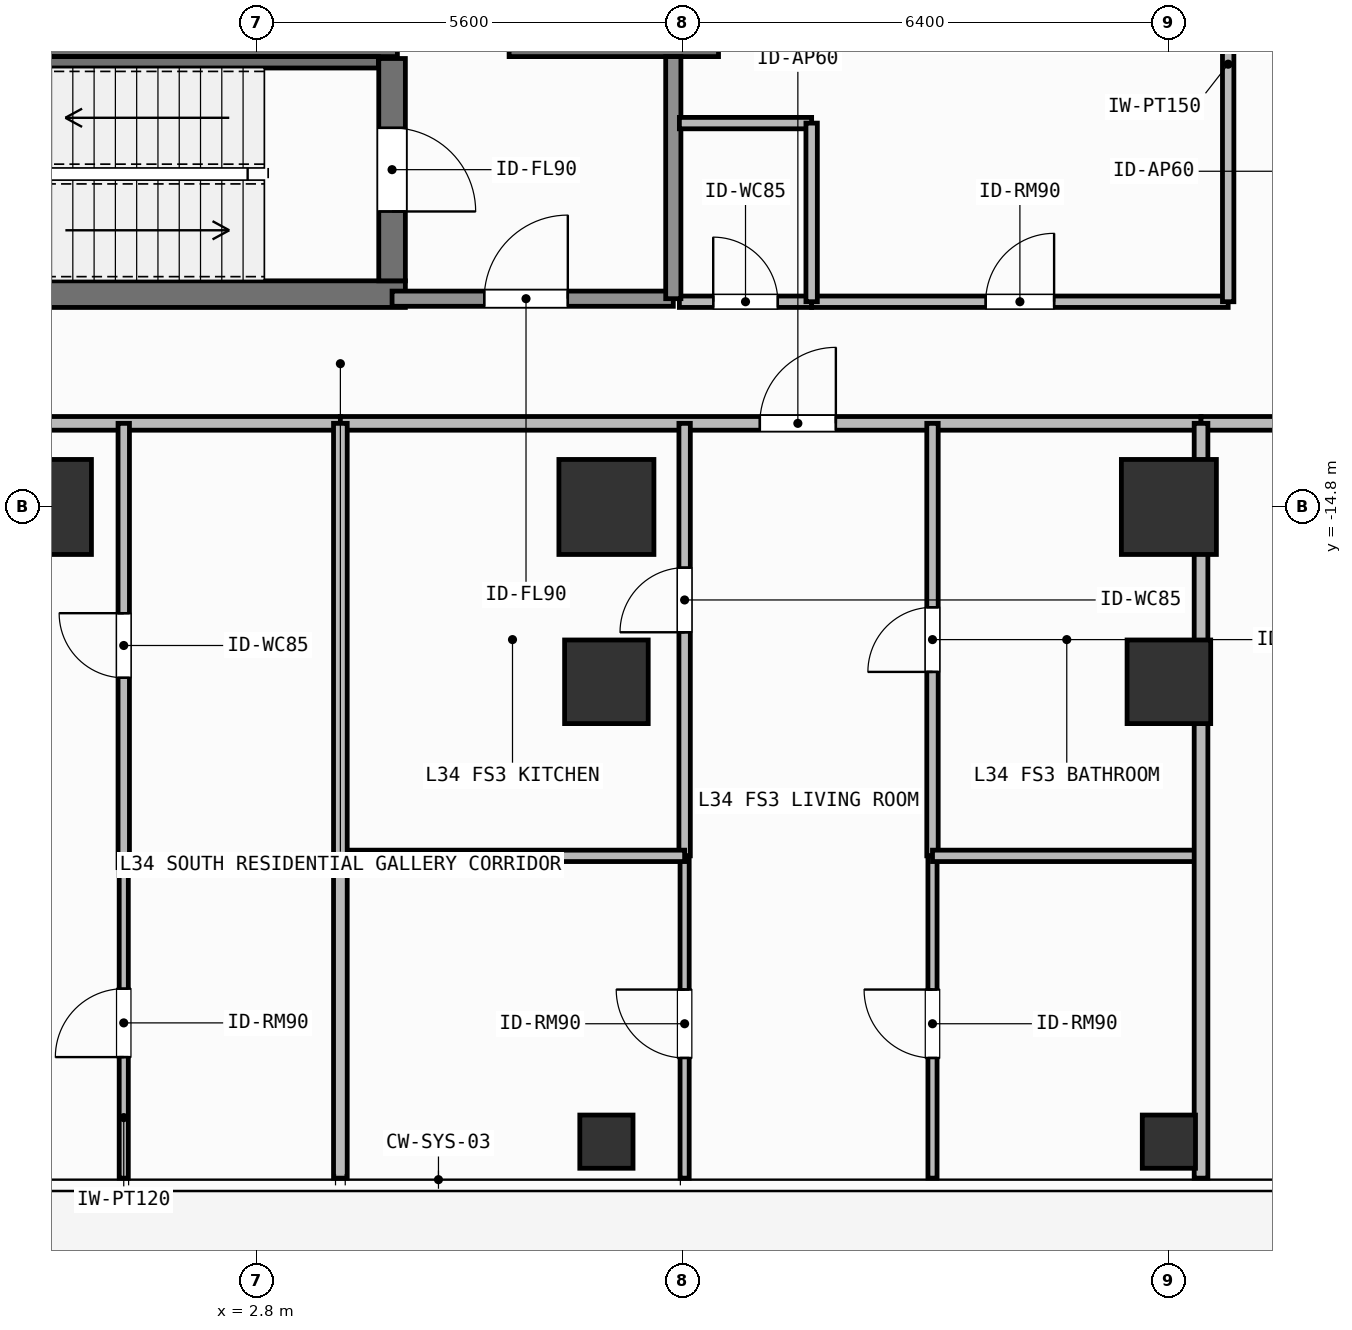
"""IFC4 building model, lengths in metres.
Left out: names, types, materials, properties, quantities, classifications, styles, units other than length and angle.
Written with IfcOpenShell. Run it as: python <this file> out.ifc"""

import sys

from ifc_helpers import new_model, si_unit, direction, frame, frame_2d, origin, origin_2d, place, context, subcontext, project, spatial, rectangle, hollow_rectangle, extrude, element, fill, save


model = new_model("IFC4")
c1 = context("Model", 3, precision=1e-05, world=origin(), true_north=direction((0.0, 1.0)))
c2 = subcontext(c1, "Body", "Model", "MODEL_VIEW")
j1 = project(units=[si_unit("LENGTHUNIT", "METRE"), si_unit("PLANEANGLEUNIT", "RADIAN")], contexts=[c1])
p1 = place(None, origin())
s1 = spatial("IfcSite", under=j1, at=p1, CompositionType="ELEMENT")
p2 = place(p1, origin())
s2 = spatial("IfcBuilding", under=s1, at=p2, CompositionType="ELEMENT")
p3 = place(p2, frame((0.0, 0.0, 136.8)))
s3 = spatial("IfcBuildingStorey", under=s2, at=p3, CompositionType="ELEMENT", Elevation=136.8)
p4 = place(p3, frame((-2.62, -8.4, 0.0), z_axis=(0.0, 0.0, 1.0), x_axis=(1.0, 0.0, 0.0)))
e1 = element("IfcWall", 1, at=p4, inside=s3, PredefinedType="SHEAR", context=c2, shape_type="SweptSolid", body=[
    extrude(rectangle(XDim=7.27, YDim=0.95, at=frame_2d((3.635, 0.0))), origin(), (0.0, 0.0, 1.0), 3.9),
])
p5 = place(p3, frame((6.12, -8.4, 0.0), z_axis=(0.0, 0.0, 1.0), x_axis=(1.0, 0.0, 0.0)))
e2 = element("IfcWall", 2, at=p5, inside=s3, PredefinedType="SHEAR", context=c2, shape_type="SweptSolid", body=[
    extrude(rectangle(XDim=2.755, YDim=0.95, at=frame_2d((1.377, 0.0))), origin(), (0.0, 0.0, 1.0), 3.9),
])
p6 = place(p3, frame((-2.555, -12.0, 0.0), z_axis=(0.0, 0.0, 1.0), x_axis=(1.0, 0.0, 0.0)))
e3 = element("IfcWall", 3, at=p6, inside=s3, PredefinedType="SHEAR", context=c2, shape_type="SweptSolid", body=[
    extrude(rectangle(XDim=7.31, YDim=0.35, at=frame_2d((3.655, 0.0))), origin(), (0.0, 0.0, 1.0), 3.9),
])
p7 = place(p3, frame((-2.2, -8.95, 0.0), z_axis=(0.0, 0.0, 1.0), x_axis=(1.0, 0.0, 0.0)))
e4 = element("IfcWall", 4, at=p7, inside=s3, PredefinedType="SHEAR", context=c2, shape_type="SweptSolid", body=[
    extrude(rectangle(XDim=6.6, YDim=0.15, at=frame_2d((3.3, 0.0))), origin(), (0.0, 0.0, 1.0), 3.9),
])
p8 = place(p3, frame((4.58, -8.9, 0.0), z_axis=(0.0, 0.0, 1.0), x_axis=(0.0, -1.0, 0.0)))
e5 = element("IfcWall", 5, at=p8, inside=s3, PredefinedType="SHEAR", context=c2, shape_type="SweptSolid", body=[
    extrude(rectangle(XDim=2.925, YDim=0.35, at=frame_2d((1.462, 0.0))), origin(), (0.0, 0.0, 1.0), 3.9),
])
p9 = place(p8, frame((0.913, 0.0, 0.0)))
e6 = element("IfcOpeningElement", 6, at=p9, cuts=e5, PredefinedType="OPENING", context=c2, shape_type="SweptSolid", body=[
    extrude(rectangle(XDim=1.1, YDim=2.15, at=frame_2d((0.55, 1.075))), frame((0.0, 0.185, 0.0), z_axis=(0.0, -1.0, 0.0), x_axis=(1.0, 0.0, 0.0)), (0.0, 0.0, 1.0), 0.37),
])
for number, where, z_axis, x_axis in (
    (7, (0.0, -14.8, 0.0), (0.0, 0.0, 1.0), (1.0, 0.0, 0.0)),
    (8, (7.4, -14.8, 0.0), (0.0, 0.0, 1.0), (1.0, 0.0, 0.0)),
    (9, (14.8, -14.8, 0.0), (0.0, 0.0, 1.0), (1.0, 0.0, 0.0)),
):
    element("IfcColumn", number, at=place(p3, frame(where, z_axis=z_axis, x_axis=x_axis)), inside=s3, PredefinedType="COLUMN", context=c2, shape_type="SweptSolid", body=[
        extrude(rectangle(XDim=1.25, YDim=1.25, at=origin_2d()), origin(), (0.0, 0.0, 1.0), 3.9),
    ])
for number, where, z_axis, x_axis in (
    (10, (7.4, -17.1, 0.0), (0.0, 0.0, 1.0), (1.0, 0.0, 0.0)),
    (11, (14.8, -17.1, 0.0), (0.0, 0.0, 1.0), (1.0, 0.0, 0.0)),
):
    element("IfcColumn", number, at=place(p3, frame(where, z_axis=z_axis, x_axis=x_axis)), inside=s3, PredefinedType="COLUMN", context=c2, shape_type="SweptSolid", body=[
        extrude(rectangle(XDim=1.1, YDim=1.1, at=origin_2d()), origin(), (0.0, 0.0, 1.0), 3.9),
    ])
for number, where, z_axis, x_axis in (
    (12, (7.4, -23.15, 0.0), (0.0, 0.0, 1.0), (1.0, 0.0, 0.0)),
    (13, (14.8, -23.15, 0.0), (0.0, 0.0, 1.0), (1.0, 0.0, 0.0)),
):
    element("IfcColumn", number, at=place(p3, frame(where, z_axis=z_axis, x_axis=x_axis)), inside=s3, PredefinedType="COLUMN", context=c2, shape_type="SweptSolid", body=[
        extrude(hollow_rectangle(XDim=0.7, YDim=0.7, WallThickness=0.032, at=origin_2d()), origin(), (0.0, 0.0, 1.0), 3.9),
    ])
p10 = place(p3, frame((4.58, -12.06, 0.0), z_axis=(0.0, 0.0, 1.0), x_axis=(1.0, 0.0, 0.0)))
e14 = element("IfcWall", 14, at=p10, inside=s3, PredefinedType="SOLIDWALL", context=c2, shape_type="SweptSolid", body=[
    extrude(rectangle(XDim=3.7, YDim=0.2, at=frame_2d((1.85, 0.0))), origin(), (0.0, 0.0, 1.0), 3.68),
])
p11 = place(p10, frame((1.212, 0.0, 0.0)))
e15 = element("IfcOpeningElement", 15, at=p11, cuts=e14, PredefinedType="OPENING", context=c2, shape_type="SweptSolid", body=[
    extrude(rectangle(XDim=1.1, YDim=2.15, at=frame_2d((0.55, 1.075))), frame((0.0, 0.11, 0.0), z_axis=(0.0, -1.0, 0.0), x_axis=(1.0, 0.0, 0.0)), (0.0, 0.0, 1.0), 0.22),
])
p12 = place(p3, frame((8.36, -12.1, 0.0), z_axis=(0.0, 0.0, 1.0), x_axis=(1.0, 0.0, 0.0)))
e16 = element("IfcWall", 16, at=p12, inside=s3, PredefinedType="PARTITIONING", context=c2, shape_type="SweptSolid", body=[
    extrude(rectangle(XDim=1.74, YDim=0.15, at=frame_2d((0.87, 0.0))), origin(), (0.0, 0.0, 1.0), 3.68),
])
p13 = place(p12, frame((0.445, 0.0, 0.0)))
e17 = element("IfcOpeningElement", 17, at=p13, cuts=e16, PredefinedType="OPENING", context=c2, shape_type="SweptSolid", body=[
    extrude(rectangle(XDim=0.85, YDim=2.1, at=frame_2d((0.425, 1.05))), frame((0.0, 0.085, 0.0), z_axis=(0.0, -1.0, 0.0), x_axis=(1.0, 0.0, 0.0)), (0.0, 0.0, 1.0), 0.17),
])
p14 = place(p3, frame((10.1, -12.1, 0.0), z_axis=(0.0, 0.0, 1.0), x_axis=(1.0, 0.0, 0.0)))
e18 = element("IfcWall", 18, at=p14, inside=s3, PredefinedType="PARTITIONING", context=c2, shape_type="SweptSolid", body=[
    extrude(rectangle(XDim=5.48, YDim=0.15, at=frame_2d((2.74, 0.0))), origin(), (0.0, 0.0, 1.0), 3.68),
])
p15 = place(p14, frame((2.29, 0.0, 0.0)))
e19 = element("IfcOpeningElement", 19, at=p15, cuts=e18, PredefinedType="OPENING", context=c2, shape_type="SweptSolid", body=[
    extrude(rectangle(XDim=0.9, YDim=2.1, at=frame_2d((0.45, 1.05))), frame((0.0, 0.085, 0.0), z_axis=(0.0, -1.0, 0.0), x_axis=(1.0, 0.0, 0.0)), (0.0, 0.0, 1.0), 0.17),
])
p16 = place(p3, frame((-7.423, -13.7, 0.0), z_axis=(0.0, 0.0, 1.0), x_axis=(1.0, 0.0, 0.0)))
e20 = element("IfcWall", 20, at=p16, inside=s3, PredefinedType="PARTITIONING", context=c2, shape_type="SweptSolid", body=[
    extrude(rectangle(XDim=11.323, YDim=0.18, at=frame_2d((5.662, 0.0))), origin(), (0.0, 0.0, 1.0), 3.68),
])
p17 = place(p16, frame((5.34, 0.0, 0.0)))
e21 = element("IfcOpeningElement", 21, at=p17, cuts=e20, PredefinedType="OPENING", context=c2, shape_type="SweptSolid", body=[
    extrude(rectangle(XDim=1.0, YDim=2.2, at=frame_2d((0.5, 1.1))), frame((0.0, 0.1, 0.0), z_axis=(0.0, -1.0, 0.0), x_axis=(1.0, 0.0, 0.0)), (0.0, 0.0, 1.0), 0.2),
])
p18 = place(p3, frame((1.05, -19.545, 0.0), z_axis=(0.0, 0.0, 1.0), x_axis=(0.0, 1.0, 0.0)))
e22 = element("IfcWall", 22, at=p18, inside=s3, PredefinedType="PARTITIONING", context=c2, shape_type="SweptSolid", body=[
    extrude(rectangle(XDim=5.845, YDim=0.15, at=frame_2d((2.922, 0.0))), origin(), (0.0, 0.0, 1.0), 3.68),
])
p19 = place(p18, frame((2.498, 0.0, 0.0)))
e23 = element("IfcOpeningElement", 23, at=p19, cuts=e22, PredefinedType="OPENING", context=c2, shape_type="SweptSolid", body=[
    extrude(rectangle(XDim=0.85, YDim=2.1, at=frame_2d((0.425, 1.05))), frame((0.0, 0.085, 0.0), z_axis=(0.0, -1.0, 0.0), x_axis=(1.0, 0.0, 0.0)), (0.0, 0.0, 1.0), 0.17),
])
p20 = place(p3, frame((1.05, -23.63, 0.0), z_axis=(0.0, 0.0, 1.0), x_axis=(0.0, 1.0, 0.0)))
e24 = element("IfcWall", 24, at=p20, inside=s3, PredefinedType="PARTITIONING", context=c2, shape_type="SweptSolid", body=[
    extrude(rectangle(XDim=4.085, YDim=0.12, at=frame_2d((2.042, 0.0))), origin(), (0.0, 0.0, 1.0), 3.68),
])
p21 = place(p20, frame((1.593, 0.0, 0.0)))
e25 = element("IfcOpeningElement", 25, at=p21, cuts=e24, PredefinedType="OPENING", context=c2, shape_type="SweptSolid", body=[
    extrude(rectangle(XDim=0.9, YDim=2.1, at=frame_2d((0.45, 1.05))), frame((0.0, 0.07, 0.0), z_axis=(0.0, -1.0, 0.0), x_axis=(1.0, 0.0, 0.0)), (0.0, 0.0, 1.0), 0.14),
])
p22 = place(p3, frame((3.9, -13.7, 0.0), z_axis=(0.0, 0.0, 1.0), x_axis=(1.0, 0.0, 0.0)))
e26 = element("IfcWall", 26, at=p22, inside=s3, PredefinedType="PARTITIONING", context=c2, shape_type="SweptSolid", body=[
    extrude(rectangle(XDim=11.323, YDim=0.18, at=frame_2d((5.662, 0.0))), origin(), (0.0, 0.0, 1.0), 3.68),
])
p23 = place(p22, frame((5.519, 0.0, 0.0)))
e27 = element("IfcOpeningElement", 27, at=p23, cuts=e26, PredefinedType="OPENING", context=c2, shape_type="SweptSolid", body=[
    extrude(rectangle(XDim=1.0, YDim=2.2, at=frame_2d((0.5, 1.1))), frame((0.0, 0.1, 0.0), z_axis=(0.0, -1.0, 0.0), x_axis=(1.0, 0.0, 0.0)), (0.0, 0.0, 1.0), 0.2),
])
p24 = place(p3, frame((8.429, -19.39, 0.0), z_axis=(0.0, 0.0, 1.0), x_axis=(0.0, 1.0, 0.0)))
e28 = element("IfcWall", 28, at=p24, inside=s3, PredefinedType="PARTITIONING", context=c2, shape_type="SweptSolid", body=[
    extrude(rectangle(XDim=5.69, YDim=0.15, at=frame_2d((2.845, 0.0))), origin(), (0.0, 0.0, 1.0), 3.68),
])
p25 = place(p24, frame((2.941, 0.0, 0.0)))
e29 = element("IfcOpeningElement", 29, at=p25, cuts=e28, PredefinedType="OPENING", context=c2, shape_type="SweptSolid", body=[
    extrude(rectangle(XDim=0.85, YDim=2.1, at=frame_2d((0.425, 1.05))), frame((0.0, 0.085, 0.0), z_axis=(0.0, -1.0, 0.0), x_axis=(1.0, 0.0, 0.0)), (0.0, 0.0, 1.0), 0.17),
])
p26 = place(p3, frame((8.429, -23.63, 0.0), z_axis=(0.0, 0.0, 1.0), x_axis=(0.0, 1.0, 0.0)))
e30 = element("IfcWall", 30, at=p26, inside=s3, PredefinedType="PARTITIONING", context=c2, shape_type="SweptSolid", body=[
    extrude(rectangle(XDim=4.24, YDim=0.12, at=frame_2d((2.12, 0.0))), origin(), (0.0, 0.0, 1.0), 3.68),
])
p27 = place(p26, frame((1.581, 0.0, 0.0)))
e31 = element("IfcOpeningElement", 31, at=p27, cuts=e30, PredefinedType="OPENING", context=c2, shape_type="SweptSolid", body=[
    extrude(rectangle(XDim=0.9, YDim=2.1, at=frame_2d((0.45, 1.05))), frame((0.0, 0.07, 0.0), z_axis=(0.0, -1.0, 0.0), x_axis=(1.0, 0.0, 0.0)), (0.0, 0.0, 1.0), 0.14),
])
p28 = place(p3, frame((11.69, -19.39, 0.0), z_axis=(0.0, 0.0, 1.0), x_axis=(0.0, 1.0, 0.0)))
e32 = element("IfcWall", 32, at=p28, inside=s3, PredefinedType="PARTITIONING", context=c2, shape_type="SweptSolid", body=[
    extrude(rectangle(XDim=5.69, YDim=0.15, at=frame_2d((2.845, 0.0))), origin(), (0.0, 0.0, 1.0), 3.68),
])
p29 = place(p28, frame((2.42, 0.0, 0.0)))
e33 = element("IfcOpeningElement", 33, at=p29, cuts=e32, PredefinedType="OPENING", context=c2, shape_type="SweptSolid", body=[
    extrude(rectangle(XDim=0.85, YDim=2.1, at=frame_2d((0.425, 1.05))), frame((0.0, 0.085, 0.0), z_axis=(0.0, -1.0, 0.0), x_axis=(1.0, 0.0, 0.0)), (0.0, 0.0, 1.0), 0.17),
])
p30 = place(p3, frame((11.69, -23.63, 0.0), z_axis=(0.0, 0.0, 1.0), x_axis=(0.0, 1.0, 0.0)))
e34 = element("IfcWall", 34, at=p30, inside=s3, PredefinedType="PARTITIONING", context=c2, shape_type="SweptSolid", body=[
    extrude(rectangle(XDim=4.24, YDim=0.12, at=frame_2d((2.12, 0.0))), origin(), (0.0, 0.0, 1.0), 3.68),
])
p31 = place(p30, frame((1.581, 0.0, 0.0)))
e35 = element("IfcOpeningElement", 35, at=p31, cuts=e34, PredefinedType="OPENING", context=c2, shape_type="SweptSolid", body=[
    extrude(rectangle(XDim=0.9, YDim=2.1, at=frame_2d((0.45, 1.05))), frame((0.0, 0.07, 0.0), z_axis=(0.0, -1.0, 0.0), x_axis=(1.0, 0.0, 0.0)), (0.0, 0.0, 1.0), 0.14),
])
p32 = place(p3, frame((15.223, -13.7, 0.0), z_axis=(0.0, 0.0, 1.0), x_axis=(1.0, 0.0, 0.0)))
e36 = element("IfcWall", 36, at=p32, inside=s3, PredefinedType="PARTITIONING", context=c2, shape_type="SweptSolid", body=[
    extrude(rectangle(XDim=8.897, YDim=0.18, at=frame_2d((4.449, 0.0))), origin(), (0.0, 0.0, 1.0), 3.68),
])
p33 = place(p32, frame((2.451, 0.0, 0.0)))
e37 = element("IfcOpeningElement", 37, at=p33, cuts=e36, PredefinedType="OPENING", context=c2, shape_type="SweptSolid", body=[
    extrude(rectangle(XDim=1.0, YDim=2.2, at=frame_2d((0.5, 1.1))), frame((0.0, 0.1, 0.0), z_axis=(0.0, -1.0, 0.0), x_axis=(1.0, 0.0, 0.0)), (0.0, 0.0, 1.0), 0.2),
])
p34 = place(p3, frame((8.28, -12.06, 0.0), z_axis=(0.0, 0.0, 1.0), x_axis=(0.0, 1.0, 0.0)))
e38 = element("IfcWall", 38, at=p34, inside=s3, PredefinedType="SOLIDWALL", context=c2, shape_type="SweptSolid", body=[
    extrude(rectangle(XDim=3.185, YDim=0.2, at=frame_2d((1.593, 0.0))), origin(), (0.0, 0.0, 1.0), 3.68),
])
p35 = place(p3, frame((8.36, -9.75, 0.0), z_axis=(0.0, 0.0, 1.0), x_axis=(1.0, 0.0, 0.0)))
e39 = element("IfcWall", 39, at=p35, inside=s3, PredefinedType="PARTITIONING", context=c2, shape_type="SweptSolid", body=[
    extrude(rectangle(XDim=1.74, YDim=0.15, at=frame_2d((0.87, 0.0))), origin(), (0.0, 0.0, 1.0), 3.68),
])
p36 = place(p3, frame((10.1, -12.1, 0.0), z_axis=(0.0, 0.0, 1.0), x_axis=(0.0, 1.0, 0.0)))
e40 = element("IfcWall", 40, at=p36, inside=s3, PredefinedType="PARTITIONING", context=c2, shape_type="SweptSolid", body=[
    extrude(rectangle(XDim=2.35, YDim=0.15, at=frame_2d((1.175, 0.0))), origin(), (0.0, 0.0, 1.0), 3.68),
])
p37 = place(p3, frame((15.58, -12.1, 0.0), z_axis=(0.0, 0.0, 1.0), x_axis=(0.0, 1.0, 0.0)))
e41 = element("IfcWall", 41, at=p37, inside=s3, PredefinedType="PARTITIONING", context=c2, shape_type="SweptSolid", body=[
    extrude(rectangle(XDim=6.25, YDim=0.15, at=frame_2d((3.125, 0.0))), origin(), (0.0, 0.0, 1.0), 3.68),
])
p38 = place(p3, frame((1.05, -19.545, 0.0), z_axis=(0.0, 0.0, 1.0), x_axis=(1.0, 0.0, 0.0)))
e42 = element("IfcWall", 42, at=p38, inside=s3, PredefinedType="PARTITIONING", context=c2, shape_type="SweptSolid", body=[
    extrude(rectangle(XDim=2.85, YDim=0.15, at=frame_2d((1.425, 0.0))), origin(), (0.0, 0.0, 1.0), 3.68),
])
p39 = place(p3, frame((3.9, -19.39, 0.0), z_axis=(0.0, 0.0, 1.0), x_axis=(1.0, 0.0, 0.0)))
e43 = element("IfcWall", 43, at=p39, inside=s3, PredefinedType="PARTITIONING", context=c2, shape_type="SweptSolid", body=[
    extrude(rectangle(XDim=4.529, YDim=0.15, at=frame_2d((2.265, 0.0))), origin(), (0.0, 0.0, 1.0), 3.68),
])
p40 = place(p3, frame((11.69, -19.39, 0.0), z_axis=(0.0, 0.0, 1.0), x_axis=(1.0, 0.0, 0.0)))
e44 = element("IfcWall", 44, at=p40, inside=s3, PredefinedType="PARTITIONING", context=c2, shape_type="SweptSolid", body=[
    extrude(rectangle(XDim=3.533, YDim=0.15, at=frame_2d((1.767, 0.0))), origin(), (0.0, 0.0, 1.0), 3.68),
])
for number, where, z_axis, x_axis in (
    (45, (3.9, -23.63, 0.0), (0.0, 0.0, 1.0), (0.0, 1.0, 0.0)),
    (46, (15.223, -23.63, 0.0), (0.0, 0.0, 1.0), (0.0, 1.0, 0.0)),
):
    element("IfcWall", number, at=place(p3, frame(where, z_axis=z_axis, x_axis=x_axis)), inside=s3, PredefinedType="PARTITIONING", context=c2, shape_type="SweptSolid", body=[
        extrude(rectangle(XDim=9.93, YDim=0.18, at=frame_2d((4.965, 0.0))), origin(), (0.0, 0.0, 1.0), 3.68),
    ])
p41 = place(p9, origin())
e47 = element("IfcDoor", 47, at=p41, inside=s3, OperationType="SINGLE_SWING_RIGHT", PredefinedType="DOOR", context=c2, shape_type="SweptSolid", body=[
    extrude(rectangle(XDim=1.1, YDim=2.15, at=frame_2d((0.55, 1.075))), frame((0.0, 0.025, 0.0), z_axis=(0.0, -1.0, 0.0), x_axis=(1.0, 0.0, 0.0)), (0.0, 0.0, 1.0), 0.05),
])
fill(e6, e47)
p42 = place(p11, origin())
e48 = element("IfcDoor", 48, at=p42, inside=s3, OperationType="SINGLE_SWING_RIGHT", PredefinedType="DOOR", context=c2, shape_type="SweptSolid", body=[
    extrude(rectangle(XDim=1.1, YDim=2.15, at=frame_2d((0.55, 1.075))), frame((0.0, 0.025, 0.0), z_axis=(0.0, -1.0, 0.0), x_axis=(1.0, 0.0, 0.0)), (0.0, 0.0, 1.0), 0.05),
])
fill(e15, e48)
p43 = place(p13, origin())
e49 = element("IfcDoor", 49, at=p43, inside=s3, OperationType="SINGLE_SWING_LEFT", PredefinedType="DOOR", context=c2, shape_type="SweptSolid", body=[
    extrude(rectangle(XDim=0.85, YDim=2.1, at=frame_2d((0.425, 1.05))), frame((0.0, 0.025, 0.0), z_axis=(0.0, -1.0, 0.0), x_axis=(1.0, 0.0, 0.0)), (0.0, 0.0, 1.0), 0.05),
])
fill(e17, e49)
p44 = place(p15, origin())
e50 = element("IfcDoor", 50, at=p44, inside=s3, OperationType="SINGLE_SWING_RIGHT", PredefinedType="DOOR", context=c2, shape_type="SweptSolid", body=[
    extrude(rectangle(XDim=0.9, YDim=2.1, at=frame_2d((0.45, 1.05))), frame((0.0, 0.025, 0.0), z_axis=(0.0, -1.0, 0.0), x_axis=(1.0, 0.0, 0.0)), (0.0, 0.0, 1.0), 0.05),
])
fill(e19, e50)
p45 = place(p19, origin())
e51 = element("IfcDoor", 51, at=p45, inside=s3, OperationType="SINGLE_SWING_RIGHT", PredefinedType="DOOR", context=c2, shape_type="SweptSolid", body=[
    extrude(rectangle(XDim=0.85, YDim=2.1, at=frame_2d((0.425, 1.05))), frame((0.0, 0.025, 0.0), z_axis=(0.0, -1.0, 0.0), x_axis=(1.0, 0.0, 0.0)), (0.0, 0.0, 1.0), 0.05),
])
fill(e23, e51)
p46 = place(p21, origin())
e52 = element("IfcDoor", 52, at=p46, inside=s3, OperationType="SINGLE_SWING_LEFT", PredefinedType="DOOR", context=c2, shape_type="SweptSolid", body=[
    extrude(rectangle(XDim=0.9, YDim=2.1, at=frame_2d((0.45, 1.05))), frame((0.0, 0.025, 0.0), z_axis=(0.0, -1.0, 0.0), x_axis=(1.0, 0.0, 0.0)), (0.0, 0.0, 1.0), 0.05),
])
fill(e25, e52)
p47 = place(p23, origin())
e53 = element("IfcDoor", 53, at=p47, inside=s3, OperationType="SINGLE_SWING_RIGHT", PredefinedType="DOOR", context=c2, shape_type="SweptSolid", body=[
    extrude(rectangle(XDim=1.0, YDim=2.2, at=frame_2d((0.5, 1.1))), frame((0.0, 0.025, 0.0), z_axis=(0.0, -1.0, 0.0), x_axis=(1.0, 0.0, 0.0)), (0.0, 0.0, 1.0), 0.05),
])
fill(e27, e53)
p48 = place(p25, origin())
e54 = element("IfcDoor", 54, at=p48, inside=s3, OperationType="SINGLE_SWING_LEFT", PredefinedType="DOOR", context=c2, shape_type="SweptSolid", body=[
    extrude(rectangle(XDim=0.85, YDim=2.1, at=frame_2d((0.425, 1.05))), frame((0.0, 0.025, 0.0), z_axis=(0.0, -1.0, 0.0), x_axis=(1.0, 0.0, 0.0)), (0.0, 0.0, 1.0), 0.05),
])
fill(e29, e54)
p49 = place(p27, origin())
e55 = element("IfcDoor", 55, at=p49, inside=s3, OperationType="SINGLE_SWING_RIGHT", PredefinedType="DOOR", context=c2, shape_type="SweptSolid", body=[
    extrude(rectangle(XDim=0.9, YDim=2.1, at=frame_2d((0.45, 1.05))), frame((0.0, 0.025, 0.0), z_axis=(0.0, -1.0, 0.0), x_axis=(1.0, 0.0, 0.0)), (0.0, 0.0, 1.0), 0.05),
])
fill(e31, e55)
p50 = place(p29, origin())
e56 = element("IfcDoor", 56, at=p50, inside=s3, OperationType="SINGLE_SWING_LEFT", PredefinedType="DOOR", context=c2, shape_type="SweptSolid", body=[
    extrude(rectangle(XDim=0.85, YDim=2.1, at=frame_2d((0.425, 1.05))), frame((0.0, 0.025, 0.0), z_axis=(0.0, -1.0, 0.0), x_axis=(1.0, 0.0, 0.0)), (0.0, 0.0, 1.0), 0.05),
])
fill(e33, e56)
p51 = place(p31, origin())
e57 = element("IfcDoor", 57, at=p51, inside=s3, OperationType="SINGLE_SWING_RIGHT", PredefinedType="DOOR", context=c2, shape_type="SweptSolid", body=[
    extrude(rectangle(XDim=0.9, YDim=2.1, at=frame_2d((0.45, 1.05))), frame((0.0, 0.025, 0.0), z_axis=(0.0, -1.0, 0.0), x_axis=(1.0, 0.0, 0.0)), (0.0, 0.0, 1.0), 0.05),
])
fill(e35, e57)
save(model, sys.argv[1])
